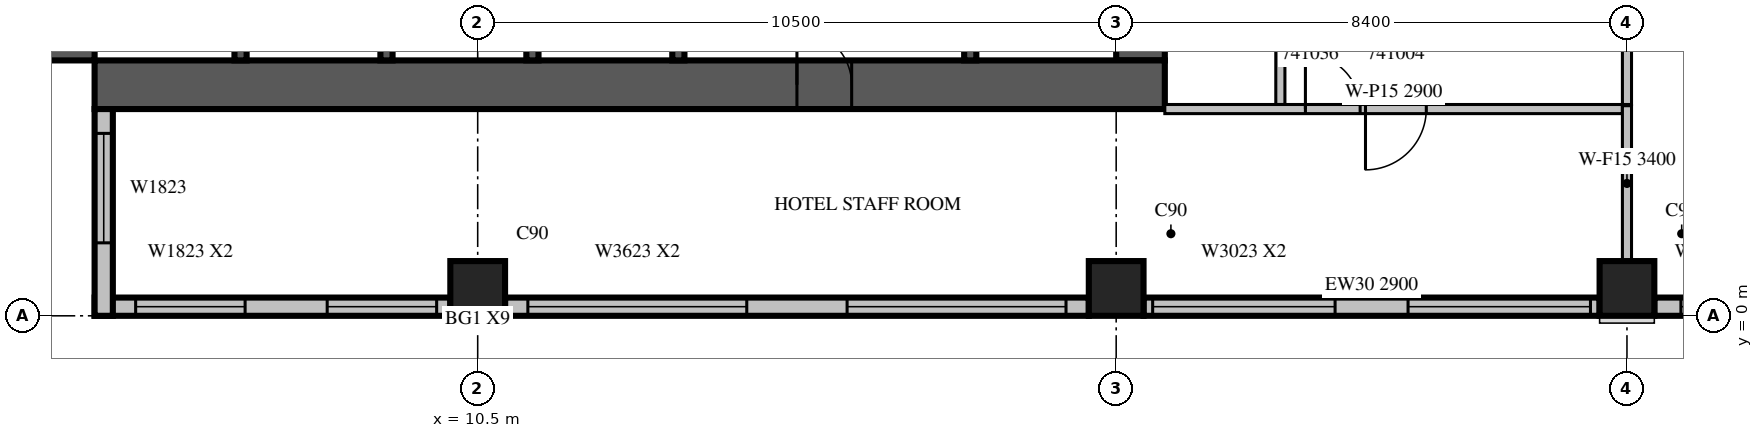
"""IFC4 building model, lengths in metres.
Left out: names, types, materials, properties, quantities, classifications, styles, units other than length and angle.
Written with IfcOpenShell. Run it as: python <this file> out.ifc"""

import sys

from ifc_helpers import new_model, si_unit, direction, frame, frame_2d, origin, origin_2d, place, context, subcontext, project, spatial, rectangle, extrude, source, transform, mapped, element, fill, save


model = new_model("IFC4")
c1 = context("Model", 3, precision=1e-05, world=origin(), true_north=direction((0.0, 1.0)))
c2 = subcontext(c1, "Body", "Model", "MODEL_VIEW")
j1 = project(units=[si_unit("LENGTHUNIT", "METRE"), si_unit("PLANEANGLEUNIT", "RADIAN")], contexts=[c1])
p1 = place(None, origin())
s1 = spatial("IfcSite", under=j1, at=p1, CompositionType="ELEMENT")
p2 = place(p1, origin())
s2 = spatial("IfcBuilding", under=s1, at=p2, CompositionType="ELEMENT")
p3 = place(p2, frame((0.0, 0.0, 189.2)))
s3 = spatial("IfcBuildingStorey", under=s2, at=p3, CompositionType="ELEMENT", Elevation=189.2)
m1 = source(origin(), c2, "Body", "SweptSolid", [
    extrude(rectangle(XDim=0.9, YDim=0.9, at=origin_2d()), origin(), (0.0, 0.0, 1.0), 3.8),
])
for number, where, z_axis, x_axis in (
    (1, (10.5, 0.45, 0.0), (0.0, 0.0, 1.0), (1.0, 0.0, 0.0)),
    (2, (21.0, 0.45, 0.0), (0.0, 0.0, 1.0), (1.0, 0.0, 0.0)),
    (3, (29.4, 0.45, 0.0), (0.0, 0.0, 1.0), (1.0, 0.0, 0.0)),
):
    element("IfcColumn", number, at=place(p3, frame(where, z_axis=z_axis, x_axis=x_axis)), inside=s3, PredefinedType="COLUMN", context=c2, shape_type="MappedRepresentation", body=[
        mapped(m1, transform((0.0, 0.0, 0.0), scale=1.0)),
    ])
m2 = source(origin(), c2, "Body", "SweptSolid", [
    extrude(rectangle(XDim=17.6, YDim=0.8, at=frame_2d((8.8, 0.0))), origin(), (0.0, 0.0, 1.0), 3.8),
])
p4 = place(p3, frame((3.8, 4.2, 0.0), z_axis=(0.0, 0.0, 1.0), x_axis=(0.0, 1.0, 0.0)))
e4 = element("IfcWall", 4, at=p4, inside=s3, PredefinedType="SHEAR", context=c2, shape_type="MappedRepresentation", body=[
    mapped(m2, transform((0.0, 0.0, 0.0), scale=1.0)),
])
m3 = source(origin(), c2, "Body", "SweptSolid", [
    extrude(rectangle(XDim=2.2, YDim=2.1, at=frame_2d((1.1, 1.05))), frame((0.0, 0.41, 0.0), z_axis=(0.0, -1.0, 0.0), x_axis=(1.0, 0.0, 0.0)), (0.0, 0.0, 1.0), 0.82),
])
p5 = place(p4, frame((4.2, 0.0, 0.0)))
e5 = element("IfcOpeningElement", 5, at=p5, cuts=e4, PredefinedType="OPENING", context=c2, shape_type="MappedRepresentation", body=[
    mapped(m3, transform((0.0, 0.0, 0.0), scale=1.0)),
])
m4 = source(origin(), c2, "Body", "SweptSolid", [
    extrude(rectangle(XDim=0.9, YDim=2.1, at=frame_2d((0.45, 1.05))), frame((0.0, 0.41, 0.0), z_axis=(0.0, -1.0, 0.0), x_axis=(1.0, 0.0, 0.0)), (0.0, 0.0, 1.0), 0.82),
])
p6 = place(p4, frame((10.95, 0.0, 0.0)))
e6 = element("IfcOpeningElement", 6, at=p6, cuts=e4, PredefinedType="OPENING", context=c2, shape_type="MappedRepresentation", body=[
    mapped(m4, transform((0.0, 0.0, 0.0), scale=1.0)),
])
m5 = source(origin(), c2, "Body", "SweptSolid", [
    extrude(rectangle(XDim=16.8, YDim=0.8, at=frame_2d((8.4, 0.0))), origin(), (0.0, 0.0, 1.0), 3.8),
])
p7 = place(p3, frame((21.4, 4.2, 0.0), z_axis=(0.0, 0.0, 1.0), x_axis=(0.0, 1.0, 0.0)))
e7 = element("IfcWall", 7, at=p7, inside=s3, PredefinedType="SHEAR", context=c2, shape_type="MappedRepresentation", body=[
    mapped(m5, transform((0.0, 0.0, 0.0), scale=1.0)),
])
p8 = place(p7, frame((4.2, 0.0, 0.0)))
e8 = element("IfcOpeningElement", 8, at=p8, cuts=e7, PredefinedType="OPENING", context=c2, shape_type="MappedRepresentation", body=[
    mapped(m3, transform((0.0, 0.0, 0.0), scale=1.0)),
])
m6 = source(origin(), c2, "Body", "SweptSolid", [
    extrude(rectangle(XDim=1.2, YDim=2.1, at=frame_2d((0.6, 1.05))), frame((0.0, 0.41, 0.0), z_axis=(0.0, -1.0, 0.0), x_axis=(1.0, 0.0, 0.0)), (0.0, 0.0, 1.0), 0.82),
])
p9 = place(p7, frame((14.7, 0.0, 0.0)))
e9 = element("IfcOpeningElement", 9, at=p9, cuts=e7, PredefinedType="OPENING", context=c2, shape_type="MappedRepresentation", body=[
    mapped(m6, transform((0.0, 0.0, 0.0), scale=1.0)),
])
p10 = place(p3, frame((4.2, 3.8, 0.0), z_axis=(0.0, 0.0, 1.0), x_axis=(1.0, 0.0, 0.0)))
e10 = element("IfcWall", 10, at=p10, inside=s3, PredefinedType="SHEAR", context=c2, shape_type="MappedRepresentation", body=[
    mapped(m2, transform((0.0, 0.0, 0.0), scale=1.0)),
])
p11 = place(p10, frame((11.55, 0.0, 0.0)))
e11 = element("IfcOpeningElement", 11, at=p11, cuts=e10, PredefinedType="OPENING", context=c2, shape_type="MappedRepresentation", body=[
    mapped(m4, transform((0.0, 0.0, 0.0), scale=1.0)),
])
m7 = source(origin(), c2, "Body", "SweptSolid", [
    extrude(rectangle(XDim=5.85, YDim=0.3, at=frame_2d((2.925, 0.0))), origin(), (0.0, 0.0, 1.0), 3.4),
])
p12 = place(p3, frame((4.2, 0.15, 0.0), z_axis=(0.0, 0.0, 1.0), x_axis=(1.0, 0.0, 0.0)))
e12 = element("IfcWall", 12, at=p12, inside=s3, PredefinedType="STANDARD", context=c2, shape_type="MappedRepresentation", body=[
    mapped(m7, transform((0.0, 0.0, 0.0), scale=1.0)),
])
m8 = source(origin(), c2, "Body", "SweptSolid", [
    extrude(rectangle(XDim=1.8, YDim=2.3, at=frame_2d((0.9, 1.15))), frame((0.0, 0.16, 0.0), z_axis=(0.0, -1.0, 0.0), x_axis=(1.0, 0.0, 0.0)), (0.0, 0.0, 1.0), 0.32),
])
p13 = place(p12, frame((0.675, 0.0, 0.6)))
e13 = element("IfcOpeningElement", 13, at=p13, cuts=e12, PredefinedType="OPENING", context=c2, shape_type="MappedRepresentation", body=[
    mapped(m8, transform((0.0, 0.0, 0.0), scale=1.0)),
])
p14 = place(p12, frame((3.825, 0.0, 0.6)))
e14 = element("IfcOpeningElement", 14, at=p14, cuts=e12, PredefinedType="OPENING", context=c2, shape_type="MappedRepresentation", body=[
    mapped(m8, transform((0.0, 0.0, 0.0), scale=1.0)),
])
m9 = source(origin(), c2, "Body", "SweptSolid", [
    extrude(rectangle(XDim=9.6, YDim=0.3, at=frame_2d((4.8, 0.0))), origin(), (0.0, 0.0, 1.0), 3.4),
])
p15 = place(p3, frame((10.95, 0.15, 0.0), z_axis=(0.0, 0.0, 1.0), x_axis=(1.0, 0.0, 0.0)))
e15 = element("IfcWall", 15, at=p15, inside=s3, PredefinedType="STANDARD", context=c2, shape_type="MappedRepresentation", body=[
    mapped(m9, transform((0.0, 0.0, 0.0), scale=1.0)),
])
m10 = source(origin(), c2, "Body", "SweptSolid", [
    extrude(rectangle(XDim=3.6, YDim=2.3, at=frame_2d((1.8, 1.15))), frame((0.0, 0.16, 0.0), z_axis=(0.0, -1.0, 0.0), x_axis=(1.0, 0.0, 0.0)), (0.0, 0.0, 1.0), 0.32),
])
p16 = place(p15, frame((0.375, 0.0, 0.6)))
e16 = element("IfcOpeningElement", 16, at=p16, cuts=e15, PredefinedType="OPENING", context=c2, shape_type="MappedRepresentation", body=[
    mapped(m10, transform((0.0, 0.0, 0.0), scale=1.0)),
])
p17 = place(p15, frame((5.625, 0.0, 0.6)))
e17 = element("IfcOpeningElement", 17, at=p17, cuts=e15, PredefinedType="OPENING", context=c2, shape_type="MappedRepresentation", body=[
    mapped(m10, transform((0.0, 0.0, 0.0), scale=1.0)),
])
m11 = source(origin(), c2, "Body", "SweptSolid", [
    extrude(rectangle(XDim=7.5, YDim=0.3, at=frame_2d((3.75, 0.0))), origin(), (0.0, 0.0, 1.0), 2.9),
])
p18 = place(p3, frame((21.45, 0.15, 0.0), z_axis=(0.0, 0.0, 1.0), x_axis=(1.0, 0.0, 0.0)))
e18 = element("IfcWall", 18, at=p18, inside=s3, PredefinedType="STANDARD", context=c2, shape_type="MappedRepresentation", body=[
    mapped(m11, transform((0.0, 0.0, 0.0), scale=1.0)),
])
m12 = source(origin(), c2, "Body", "SweptSolid", [
    extrude(rectangle(XDim=3.0, YDim=2.3, at=frame_2d((1.5, 1.15))), frame((0.0, 0.16, 0.0), z_axis=(0.0, -1.0, 0.0), x_axis=(1.0, 0.0, 0.0)), (0.0, 0.0, 1.0), 0.32),
])
p19 = place(p18, frame((0.15, 0.0, 0.6)))
e19 = element("IfcOpeningElement", 19, at=p19, cuts=e18, PredefinedType="OPENING", context=c2, shape_type="MappedRepresentation", body=[
    mapped(m12, transform((0.0, 0.0, 0.0), scale=1.0)),
])
p20 = place(p18, frame((4.35, 0.0, 0.6)))
e20 = element("IfcOpeningElement", 20, at=p20, cuts=e18, PredefinedType="OPENING", context=c2, shape_type="MappedRepresentation", body=[
    mapped(m12, transform((0.0, 0.0, 0.0), scale=1.0)),
])
m13 = source(origin(), c2, "Body", "SweptSolid", [
    extrude(rectangle(XDim=7.5, YDim=0.3, at=frame_2d((3.75, 0.0))), origin(), (0.0, 0.0, 1.0), 3.4),
])
p21 = place(p3, frame((29.85, 0.15, 0.0), z_axis=(0.0, 0.0, 1.0), x_axis=(1.0, 0.0, 0.0)))
e21 = element("IfcWall", 21, at=p21, inside=s3, PredefinedType="STANDARD", context=c2, shape_type="MappedRepresentation", body=[
    mapped(m13, transform((0.0, 0.0, 0.0), scale=1.0)),
])
m14 = source(origin(), c2, "Body", "SweptSolid", [
    extrude(rectangle(XDim=1.2, YDim=2.3, at=frame_2d((0.6, 1.15))), frame((0.0, 0.16, 0.0), z_axis=(0.0, -1.0, 0.0), x_axis=(1.0, 0.0, 0.0)), (0.0, 0.0, 1.0), 0.32),
])
p22 = place(p21, frame((0.438, 0.0, 0.6)))
e22 = element("IfcOpeningElement", 22, at=p22, cuts=e21, PredefinedType="OPENING", context=c2, shape_type="MappedRepresentation", body=[
    mapped(m14, transform((0.0, 0.0, 0.0), scale=1.0)),
])
p23 = place(p21, frame((5.963, 0.0, 0.6)))
e23 = element("IfcOpeningElement", 23, at=p23, cuts=e21, PredefinedType="OPENING", context=c2, shape_type="MappedRepresentation", body=[
    mapped(m14, transform((0.0, 0.0, 0.0), scale=1.0)),
])
m15 = source(origin(), c2, "Body", "SweptSolid", [
    extrude(rectangle(XDim=2.4, YDim=2.3, at=frame_2d((1.2, 1.15))), frame((0.0, 0.16, 0.0), z_axis=(0.0, -1.0, 0.0), x_axis=(1.0, 0.0, 0.0)), (0.0, 0.0, 1.0), 0.32),
])
p24 = place(p21, frame((2.6, 0.0, 0.6)))
e24 = element("IfcOpeningElement", 24, at=p24, cuts=e21, PredefinedType="OPENING", context=c2, shape_type="MappedRepresentation", body=[
    mapped(m15, transform((0.0, 0.0, 0.0), scale=1.0)),
])
m16 = source(origin(), c2, "Body", "SweptSolid", [
    extrude(rectangle(XDim=3.4, YDim=0.3, at=frame_2d((1.7, 0.0))), origin(), (0.0, 0.0, 1.0), 3.4),
])
p25 = place(p3, frame((4.35, 3.4, 0.0), z_axis=(0.0, 0.0, 1.0), x_axis=(0.0, -1.0, 0.0)))
e25 = element("IfcWall", 25, at=p25, inside=s3, PredefinedType="STANDARD", context=c2, shape_type="MappedRepresentation", body=[
    mapped(m16, transform((0.0, 0.0, 0.0), scale=1.0)),
])
p26 = place(p25, frame((0.4, 0.0, 0.6)))
e26 = element("IfcOpeningElement", 26, at=p26, cuts=e25, PredefinedType="OPENING", context=c2, shape_type="MappedRepresentation", body=[
    mapped(m8, transform((0.0, 0.0, 0.0), scale=1.0)),
])
m17 = source(origin(), c2, "Body", "SweptSolid", [
    extrude(rectangle(XDim=3.1, YDim=0.2, at=frame_2d((1.55, 0.0))), origin(), (0.0, 0.0, 1.0), 3.8),
])
for number, where, z_axis, x_axis in (
    (27, (6.6, 4.2, 0.0), (0.0, 0.0, 1.0), (0.0, 1.0, 0.0)),
    (28, (9.0, 4.2, 0.0), (0.0, 0.0, 1.0), (0.0, 1.0, 0.0)),
    (29, (11.4, 4.2, 0.0), (0.0, 0.0, 1.0), (0.0, 1.0, 0.0)),
):
    element("IfcWall", number, at=place(p3, frame(where, z_axis=z_axis, x_axis=x_axis)), inside=s3, PredefinedType="SOLIDWALL", context=c2, shape_type="MappedRepresentation", body=[
        mapped(m17, transform((0.0, 0.0, 0.0), scale=1.0)),
    ])
m18 = source(origin(), c2, "Body", "SweptSolid", [
    extrude(rectangle(XDim=3.1, YDim=0.2, at=frame_2d((1.55, 0.0))), origin(), (0.0, 0.0, 1.0), 3.4),
])
for number, where, z_axis, x_axis in (
    (30, (13.8, 4.2, 0.0), (0.0, 0.0, 1.0), (0.0, 1.0, 0.0)),
    (31, (18.6, 4.2, 0.0), (0.0, 0.0, 1.0), (0.0, 1.0, 0.0)),
):
    element("IfcWall", number, at=place(p3, frame(where, z_axis=z_axis, x_axis=x_axis)), inside=s3, PredefinedType="SOLIDWALL", context=c2, shape_type="MappedRepresentation", body=[
        mapped(m18, transform((0.0, 0.0, 0.0), scale=1.0)),
    ])
m19 = source(origin(), c2, "Body", "SweptSolid", [
    extrude(rectangle(XDim=11.525, YDim=0.15, at=frame_2d((5.763, 0.0))), origin(), (0.0, 0.0, 1.0), 2.4),
])
p27 = place(p3, frame((23.7, 15.0, 0.0), z_axis=(0.0, 0.0, 1.0), x_axis=(0.0, -1.0, 0.0)))
e32 = element("IfcWall", 32, at=p27, inside=s3, PredefinedType="PARTITIONING", context=c2, shape_type="MappedRepresentation", body=[
    mapped(m19, transform((0.0, 0.0, 0.0), scale=1.0)),
])
m20 = source(origin(), c2, "Body", "SweptSolid", [
    extrude(rectangle(XDim=0.9, YDim=2.1, at=frame_2d((0.45, 1.05))), frame((0.0, 0.085, 0.0), z_axis=(0.0, -1.0, 0.0), x_axis=(1.0, 0.0, 0.0)), (0.0, 0.0, 1.0), 0.17),
])
p28 = place(p27, frame((7.562, 0.0, 0.0)))
e33 = element("IfcOpeningElement", 33, at=p28, cuts=e32, PredefinedType="OPENING", context=c2, shape_type="MappedRepresentation", body=[
    mapped(m20, transform((0.0, 0.0, 0.0), scale=1.0)),
])
p29 = place(p27, frame((0.925, 0.0, 0.0)))
e34 = element("IfcOpeningElement", 34, at=p29, cuts=e32, PredefinedType="OPENING", context=c2, shape_type="MappedRepresentation", body=[
    mapped(m20, transform((0.0, 0.0, 0.0), scale=1.0)),
])
m21 = source(origin(), c2, "Body", "SweptSolid", [
    extrude(rectangle(XDim=6.576, YDim=0.15, at=frame_2d((3.288, 0.0))), origin(), (0.0, 0.0, 1.0), 3.4),
])
p30 = place(p3, frame((29.4, 3.475, 0.0), z_axis=(0.0, 0.0, 1.0), x_axis=(0.0, 1.0, 0.0)))
e35 = element("IfcWall", 35, at=p30, inside=s3, PredefinedType="PARTITIONING", context=c2, shape_type="MappedRepresentation", body=[
    mapped(m21, transform((0.0, 0.0, 0.0), scale=1.0)),
])
m22 = source(origin(), c2, "Body", "SweptSolid", [
    extrude(rectangle(XDim=7.525, YDim=0.15, at=frame_2d((3.763, 0.0))), origin(), (0.0, 0.0, 1.0), 2.9),
])
p31 = place(p3, frame((21.8, 3.4, 0.0), z_axis=(0.0, 0.0, 1.0), x_axis=(1.0, 0.0, 0.0)))
e36 = element("IfcWall", 36, at=p31, inside=s3, PredefinedType="PARTITIONING", context=c2, shape_type="MappedRepresentation", body=[
    mapped(m22, transform((0.0, 0.0, 0.0), scale=1.0)),
])
m23 = source(origin(), c2, "Body", "SweptSolid", [
    extrude(rectangle(XDim=1.0, YDim=2.1, at=frame_2d((0.5, 1.05))), frame((0.0, 0.085, 0.0), z_axis=(0.0, -1.0, 0.0), x_axis=(1.0, 0.0, 0.0)), (0.0, 0.0, 1.0), 0.17),
])
p32 = place(p31, frame((3.3, 0.0, 0.0)))
e37 = element("IfcOpeningElement", 37, at=p32, cuts=e36, PredefinedType="OPENING", context=c2, shape_type="MappedRepresentation", body=[
    mapped(m23, transform((0.0, 0.0, 0.0), scale=1.0)),
])
p33 = place(p31, frame((2.312, 0.0, 0.0)))
e38 = element("IfcOpeningElement", 38, at=p33, cuts=e36, PredefinedType="OPENING", context=c2, shape_type="MappedRepresentation", body=[
    mapped(m20, transform((0.0, 0.0, 0.0), scale=1.0)),
])
m24 = source(origin(), c2, "Body", "SweptSolid", [
    extrude(rectangle(XDim=2.556, YDim=0.15, at=frame_2d((1.278, 0.0))), origin(), (0.0, 0.0, 1.0), 3.4),
])
p34 = place(p3, frame((29.4, 0.899, 0.0), z_axis=(0.0, 0.0, 1.0), x_axis=(0.0, 1.0, 0.0)))
e39 = element("IfcWall", 39, at=p34, inside=s3, PredefinedType="PARTITIONING", context=c2, shape_type="MappedRepresentation", body=[
    mapped(m24, transform((0.0, 0.0, 0.0), scale=1.0)),
])
m25 = source(origin(), c2, "Body", "SweptSolid", [
    extrude(rectangle(XDim=1.8, YDim=2.3, at=frame_2d((0.9, 1.15))), frame((0.0, 0.03, 0.0), z_axis=(0.0, -1.0, 0.0), x_axis=(1.0, 0.0, 0.0)), (0.0, 0.0, 1.0), 0.06),
])
p35 = place(p13, origin())
e40 = element("IfcWindow", 40, at=p35, inside=s3, PartitioningType="SINGLE_PANEL", PredefinedType="WINDOW", context=c2, shape_type="MappedRepresentation", body=[
    mapped(m25, transform((0.0, 0.0, 0.0), scale=1.0)),
])
fill(e13, e40)
p36 = place(p14, origin())
e41 = element("IfcWindow", 41, at=p36, inside=s3, PartitioningType="SINGLE_PANEL", PredefinedType="WINDOW", context=c2, shape_type="MappedRepresentation", body=[
    mapped(m25, transform((0.0, 0.0, 0.0), scale=1.0)),
])
fill(e14, e41)
m26 = source(origin(), c2, "Body", "SweptSolid", [
    extrude(rectangle(XDim=3.6, YDim=2.3, at=frame_2d((1.8, 1.15))), frame((0.0, 0.03, 0.0), z_axis=(0.0, -1.0, 0.0), x_axis=(1.0, 0.0, 0.0)), (0.0, 0.0, 1.0), 0.06),
])
p37 = place(p16, origin())
e42 = element("IfcWindow", 42, at=p37, inside=s3, PartitioningType="SINGLE_PANEL", PredefinedType="WINDOW", context=c2, shape_type="MappedRepresentation", body=[
    mapped(m26, transform((0.0, 0.0, 0.0), scale=1.0)),
])
fill(e16, e42)
p38 = place(p17, origin())
e43 = element("IfcWindow", 43, at=p38, inside=s3, PartitioningType="SINGLE_PANEL", PredefinedType="WINDOW", context=c2, shape_type="MappedRepresentation", body=[
    mapped(m26, transform((0.0, 0.0, 0.0), scale=1.0)),
])
fill(e17, e43)
m27 = source(origin(), c2, "Body", "SweptSolid", [
    extrude(rectangle(XDim=3.0, YDim=2.3, at=frame_2d((1.5, 1.15))), frame((0.0, 0.03, 0.0), z_axis=(0.0, -1.0, 0.0), x_axis=(1.0, 0.0, 0.0)), (0.0, 0.0, 1.0), 0.06),
])
p39 = place(p19, origin())
e44 = element("IfcWindow", 44, at=p39, inside=s3, PartitioningType="SINGLE_PANEL", PredefinedType="WINDOW", context=c2, shape_type="MappedRepresentation", body=[
    mapped(m27, transform((0.0, 0.0, 0.0), scale=1.0)),
])
fill(e19, e44)
p40 = place(p20, origin())
e45 = element("IfcWindow", 45, at=p40, inside=s3, PartitioningType="SINGLE_PANEL", PredefinedType="WINDOW", context=c2, shape_type="MappedRepresentation", body=[
    mapped(m27, transform((0.0, 0.0, 0.0), scale=1.0)),
])
fill(e20, e45)
m28 = source(origin(), c2, "Body", "SweptSolid", [
    extrude(rectangle(XDim=1.2, YDim=2.3, at=frame_2d((0.6, 1.15))), frame((0.0, 0.03, 0.0), z_axis=(0.0, -1.0, 0.0), x_axis=(1.0, 0.0, 0.0)), (0.0, 0.0, 1.0), 0.06),
])
p41 = place(p22, origin())
e46 = element("IfcWindow", 46, at=p41, inside=s3, PartitioningType="SINGLE_PANEL", PredefinedType="WINDOW", context=c2, shape_type="MappedRepresentation", body=[
    mapped(m28, transform((0.0, 0.0, 0.0), scale=1.0)),
])
fill(e22, e46)
p42 = place(p26, origin())
e47 = element("IfcWindow", 47, at=p42, inside=s3, PartitioningType="SINGLE_PANEL", PredefinedType="WINDOW", context=c2, shape_type="MappedRepresentation", body=[
    mapped(m25, transform((0.0, 0.0, 0.0), scale=1.0)),
])
fill(e26, e47)
m29 = source(origin(), c2, "Body", "SweptSolid", [
    extrude(rectangle(XDim=0.9, YDim=2.1, at=frame_2d((0.45, 1.05))), frame((0.0, 0.025, 0.0), z_axis=(0.0, -1.0, 0.0), x_axis=(1.0, 0.0, 0.0)), (0.0, 0.0, 1.0), 0.05),
])
p43 = place(p11, origin())
e48 = element("IfcDoor", 48, at=p43, inside=s3, OperationType="SINGLE_SWING_LEFT", PredefinedType="DOOR", context=c2, shape_type="MappedRepresentation", body=[
    mapped(m29, transform((0.0, 0.0, 0.0), scale=1.0)),
])
fill(e11, e48)
m30 = source(origin(), c2, "Body", "SweptSolid", [
    extrude(rectangle(XDim=1.0, YDim=2.1, at=frame_2d((0.5, 1.05))), frame((0.0, 0.025, 0.0), z_axis=(0.0, -1.0, 0.0), x_axis=(1.0, 0.0, 0.0)), (0.0, 0.0, 1.0), 0.05),
])
p44 = place(p32, origin())
e49 = element("IfcDoor", 49, at=p44, inside=s3, OperationType="SINGLE_SWING_RIGHT", PredefinedType="DOOR", context=c2, shape_type="MappedRepresentation", body=[
    mapped(m30, transform((0.0, 0.0, 0.0), scale=1.0)),
])
fill(e37, e49)
p45 = place(p33, origin())
e50 = element("IfcDoor", 50, at=p45, inside=s3, OperationType="SINGLE_SWING_LEFT", PredefinedType="DOOR", context=c2, shape_type="MappedRepresentation", body=[
    mapped(m29, transform((0.0, 0.0, 0.0), scale=1.0)),
])
fill(e38, e50)
save(model, sys.argv[1])
